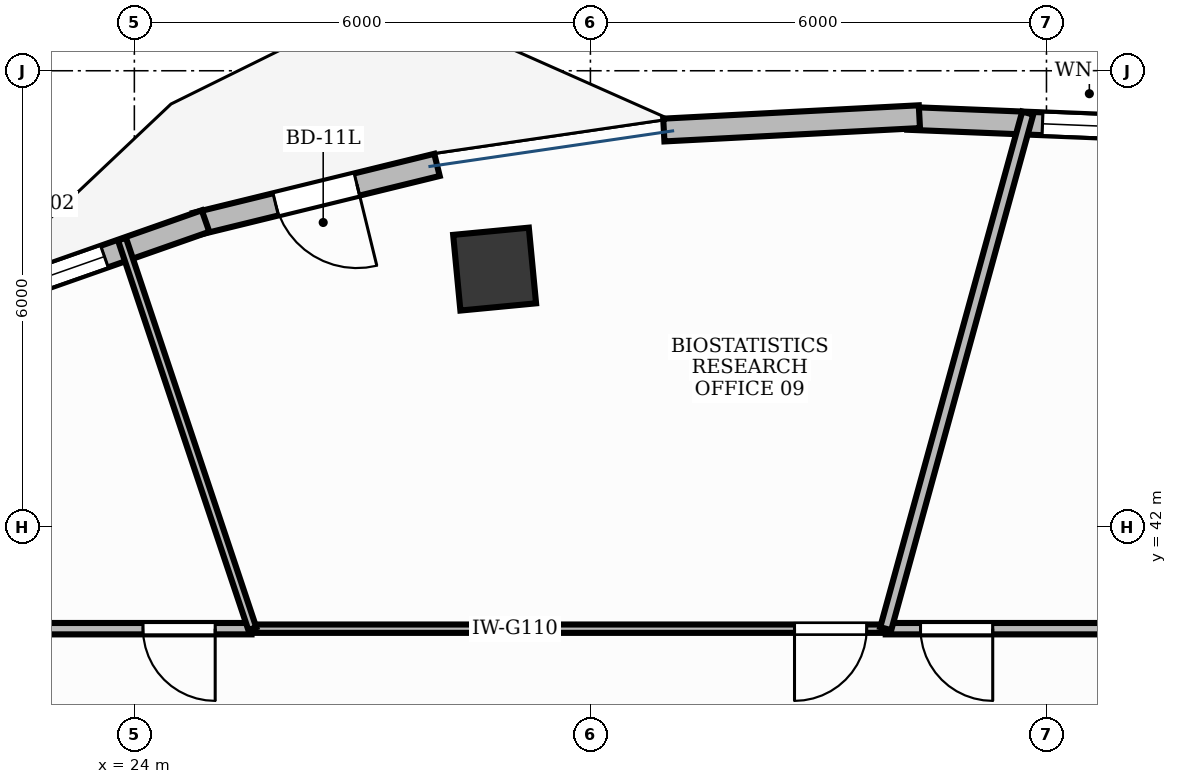
"""IFC4 building model, lengths in metres.
Left out: names, types, materials, properties, quantities, classifications, styles, units other than length and angle.
Written with IfcOpenShell. Run it as: python <this file> out.ifc"""

import sys

from ifc_helpers import new_model, si_unit, direction, frame, frame_2d, origin, origin_2d, place, context, subcontext, project, spatial, rectangle, extrude, element, fill, save


model = new_model("IFC4")
c1 = context("Model", 3, precision=1e-05, world=origin(), true_north=direction((0.0, 1.0)))
c2 = subcontext(c1, "Body", "Model", "MODEL_VIEW")
j1 = project(units=[si_unit("LENGTHUNIT", "METRE"), si_unit("PLANEANGLEUNIT", "RADIAN")], contexts=[c1])
p1 = place(None, origin())
s1 = spatial("IfcSite", under=j1, at=p1, CompositionType="ELEMENT")
p2 = place(p1, origin())
s2 = spatial("IfcBuilding", under=s1, at=p2, CompositionType="ELEMENT")
p3 = place(p2, frame((0.0, 0.0, 154.2)))
s3 = spatial("IfcBuildingStorey", under=s2, at=p3, CompositionType="ELEMENT", Elevation=154.2)
p4 = place(p3, frame((28.74, 45.39, -0.0), z_axis=(0.0, 0.0, 1.0), x_axis=(0.995462868748, 0.095150811579, 0.0)))
e1 = element("IfcColumn", 1, at=p4, inside=s3, PredefinedType="COLUMN", context=c2, shape_type="SweptSolid", body=[
    extrude(rectangle(XDim=1.0, YDim=1.0, at=origin_2d()), origin(), (0.0, 0.0, 1.0), 3.901),
])
p5 = place(p3, frame((37.5, 47.24, 0.0), z_axis=(0.0, 0.0, 1.0), x_axis=(-0.999191674443, 0.040199474165, 0.0)))
e2 = element("IfcWall", 2, at=p5, inside=s3, PredefinedType="STANDARD", context=c2, shape_type="SweptSolid", body=[
    extrude(rectangle(XDim=3.328, YDim=0.3, at=frame_2d((1.664, 0.0))), origin(), (0.0, 0.0, 1.0), 3.9),
])
p6 = place(p5, frame((0.353, 0.0, 0.9)))
e3 = element("IfcOpeningElement", 3, at=p6, cuts=e2, PredefinedType="OPENING", context=c2, shape_type="SweptSolid", body=[
    extrude(rectangle(XDim=1.2, YDim=2.7, at=frame_2d((0.6, 1.35))), frame((0.0, 0.165, 0.0), z_axis=(0.0, -1.0, 0.0), x_axis=(1.0, 0.0, 0.0)), (0.0, 0.0, 1.0), 0.33),
])
p7 = place(p3, frame((27.982, 46.762, 0.0), z_axis=(0.0, 0.0, 1.0), x_axis=(-0.971312804689, -0.237805457142, 0.0)))
e4 = element("IfcWall", 4, at=p7, inside=s3, PredefinedType="STANDARD", context=c2, shape_type="SweptSolid", body=[
    extrude(rectangle(XDim=3.269, YDim=0.3, at=frame_2d((1.634, 0.0))), origin(), (0.0, 0.0, 1.0), 3.9),
])
p8 = place(p7, frame((1.084, 0.0, 0.0)))
e5 = element("IfcOpeningElement", 5, at=p8, cuts=e4, PredefinedType="OPENING", context=c2, shape_type="SweptSolid", body=[
    extrude(rectangle(XDim=1.1, YDim=2.15, at=frame_2d((0.55, 1.075))), frame((0.0, 0.165, 0.0), z_axis=(0.0, -1.0, 0.0), x_axis=(1.0, 0.0, 0.0)), (0.0, 0.0, 1.0), 0.33),
])
p9 = place(p3, frame((24.937, 46.023, 0.0), z_axis=(0.0, 0.0, 1.0), x_axis=(-0.943495444321, -0.331385495377, 0.0)))
e6 = element("IfcWall", 6, at=p9, inside=s3, PredefinedType="STANDARD", context=c2, shape_type="SweptSolid", body=[
    extrude(rectangle(XDim=3.214, YDim=0.3, at=frame_2d((1.607, 0.0))), origin(), (0.0, 0.0, 1.0), 3.9),
])
p10 = place(p9, frame((1.41, 0.0, 0.95)))
e7 = element("IfcOpeningElement", 7, at=p10, cuts=e6, PredefinedType="OPENING", context=c2, shape_type="SweptSolid", body=[
    extrude(rectangle(XDim=1.5, YDim=1.8, at=frame_2d((0.75, 0.9))), frame((0.0, 0.165, 0.0), z_axis=(0.0, -1.0, 0.0), x_axis=(1.0, 0.0, 0.0)), (0.0, 0.0, 1.0), 0.33),
])
p11 = place(p3, frame((34.328, 47.396, 0.0), z_axis=(0.0, 0.0, 1.0), x_axis=(-0.998639777298, -0.052140149581, 0.0)))
e8 = element("IfcWall", 8, at=p11, inside=s3, PredefinedType="STANDARD", context=c2, shape_type="SweptSolid", body=[
    extrude(rectangle(XDim=3.367, YDim=0.3, at=frame_2d((1.683, 0.0))), origin(), (0.0, 0.0, 1.0), 3.9),
])
p12 = place(p3, frame((37.2, 40.66, 0.0), z_axis=(0.0, 0.0, 1.0), x_axis=(-1.0, 0.0, 0.0)))
e9 = element("IfcWall", 9, at=p12, inside=s3, PredefinedType="PARTITIONING", context=c2, shape_type="SweptSolid", body=[
    extrude(rectangle(XDim=3.315, YDim=0.15, at=frame_2d((1.657, 0.0))), origin(), (0.0, 0.0, 1.0), 2.91),
])
p13 = place(p12, frame((1.907, 0.0, 0.0)))
e10 = element("IfcOpeningElement", 10, at=p13, cuts=e9, PredefinedType="OPENING", context=c2, shape_type="SweptSolid", body=[
    extrude(rectangle(XDim=0.95, YDim=2.15, at=frame_2d((0.475, 1.075))), frame((0.0, 0.09, 0.0), z_axis=(0.0, -1.0, 0.0), x_axis=(1.0, 0.0, 0.0)), (0.0, 0.0, 1.0), 0.18),
])
p14 = place(p3, frame((33.875, 40.66, 0.0), z_axis=(0.0, 0.0, 1.0), x_axis=(-1.0, 0.0, 0.0)))
e11 = element("IfcWall", 11, at=p14, inside=s3, PredefinedType="MOVABLE", context=c2, shape_type="SweptSolid", body=[
    extrude(rectangle(XDim=8.323, YDim=0.11, at=frame_2d((4.162, 0.0))), origin(), (0.0, 0.0, 1.0), 2.91),
])
p15 = place(p14, frame((0.24, 0.0, 0.0)))
e12 = element("IfcOpeningElement", 12, at=p15, cuts=e11, PredefinedType="OPENING", context=c2, shape_type="SweptSolid", body=[
    extrude(rectangle(XDim=0.95, YDim=2.15, at=frame_2d((0.475, 1.075))), frame((0.0, 0.07, 0.0), z_axis=(0.0, -1.0, 0.0), x_axis=(1.0, 0.0, 0.0)), (0.0, 0.0, 1.0), 0.14),
])
p16 = place(p3, frame((25.542, 40.66, 0.0), z_axis=(0.0, 0.0, 1.0), x_axis=(-1.0, 0.0, 0.0)))
e13 = element("IfcWall", 13, at=p16, inside=s3, PredefinedType="PARTITIONING", context=c2, shape_type="SweptSolid", body=[
    extrude(rectangle(XDim=3.792, YDim=0.15, at=frame_2d((1.896, 0.0))), origin(), (0.0, 0.0, 1.0), 2.91),
])
p17 = place(p16, frame((0.478, 0.0, 0.0)))
e14 = element("IfcOpeningElement", 14, at=p17, cuts=e13, PredefinedType="OPENING", context=c2, shape_type="SweptSolid", body=[
    extrude(rectangle(XDim=0.95, YDim=2.15, at=frame_2d((0.475, 1.075))), frame((0.0, 0.09, 0.0), z_axis=(0.0, -1.0, 0.0), x_axis=(1.0, 0.0, 0.0)), (0.0, 0.0, 1.0), 0.18),
])
p18 = place(p3, frame((33.885, 40.66, 0.0), z_axis=(0.0, 0.0, 1.0), x_axis=(0.26554760057, 0.964097750143, 0.0)))
e15 = element("IfcWall", 15, at=p18, inside=s3, PredefinedType="PARTITIONING", context=c2, shape_type="SweptSolid", body=[
    extrude(rectangle(XDim=7.036, YDim=0.15, at=frame_2d((3.518, 0.0))), origin(), (0.0, 0.0, 1.0), 2.91),
])
p19 = place(p3, frame((25.552, 40.66, 0.0), z_axis=(0.0, 0.0, 1.0), x_axis=(-0.317298174949, 0.948325823847, 0.0)))
e16 = element("IfcWall", 16, at=p19, inside=s3, PredefinedType="MOVABLE", context=c2, shape_type="SweptSolid", body=[
    extrude(rectangle(XDim=5.405, YDim=0.11, at=frame_2d((2.702, 0.0))), origin(), (0.0, 0.0, 1.0), 2.91),
])
p20 = place(p6, origin())
e17 = element("IfcWindow", 17, at=p20, inside=s3, PartitioningType="SINGLE_PANEL", PredefinedType="WINDOW", context=c2, shape_type="SweptSolid", body=[
    extrude(rectangle(XDim=1.2, YDim=2.7, at=frame_2d((0.6, 1.35))), frame((0.0, 0.03, 0.0), z_axis=(0.0, -1.0, 0.0), x_axis=(1.0, 0.0, 0.0)), (0.0, 0.0, 1.0), 0.06),
])
fill(e3, e17)
p21 = place(p8, origin())
e18 = element("IfcDoor", 18, at=p21, inside=s3, OperationType="SINGLE_SWING_LEFT", PredefinedType="DOOR", context=c2, shape_type="SweptSolid", body=[
    extrude(rectangle(XDim=1.1, YDim=2.15, at=frame_2d((0.55, 1.075))), frame((0.0, 0.025, 0.0), z_axis=(0.0, -1.0, 0.0), x_axis=(1.0, 0.0, 0.0)), (0.0, 0.0, 1.0), 0.05),
])
fill(e5, e18)
p22 = place(p10, origin())
e19 = element("IfcWindow", 19, at=p22, inside=s3, PartitioningType="DOUBLE_PANEL_VERTICAL", PredefinedType="WINDOW", context=c2, shape_type="SweptSolid", body=[
    extrude(rectangle(XDim=1.5, YDim=1.8, at=frame_2d((0.75, 0.9))), frame((0.0, 0.03, 0.0), z_axis=(0.0, -1.0, 0.0), x_axis=(1.0, 0.0, 0.0)), (0.0, 0.0, 1.0), 0.06),
])
fill(e7, e19)
p23 = place(p13, origin())
e20 = element("IfcDoor", 20, at=p23, inside=s3, OperationType="SINGLE_SWING_LEFT", PredefinedType="DOOR", context=c2, shape_type="SweptSolid", body=[
    extrude(rectangle(XDim=0.95, YDim=2.15, at=frame_2d((0.475, 1.075))), frame((0.0, 0.025, 0.0), z_axis=(0.0, -1.0, 0.0), x_axis=(1.0, 0.0, 0.0)), (0.0, 0.0, 1.0), 0.05),
])
fill(e10, e20)
p24 = place(p15, origin())
e21 = element("IfcDoor", 21, at=p24, inside=s3, OperationType="SINGLE_SWING_RIGHT", PredefinedType="DOOR", context=c2, shape_type="SweptSolid", body=[
    extrude(rectangle(XDim=0.95, YDim=2.15, at=frame_2d((0.475, 1.075))), frame((0.0, 0.025, 0.0), z_axis=(0.0, -1.0, 0.0), x_axis=(1.0, 0.0, 0.0)), (0.0, 0.0, 1.0), 0.05),
])
fill(e12, e21)
p25 = place(p17, origin())
e22 = element("IfcDoor", 22, at=p25, inside=s3, OperationType="SINGLE_SWING_LEFT", PredefinedType="DOOR", context=c2, shape_type="SweptSolid", body=[
    extrude(rectangle(XDim=0.95, YDim=2.15, at=frame_2d((0.475, 1.075))), frame((0.0, 0.025, 0.0), z_axis=(0.0, -1.0, 0.0), x_axis=(1.0, 0.0, 0.0)), (0.0, 0.0, 1.0), 0.05),
])
fill(e14, e22)
save(model, sys.argv[1])
